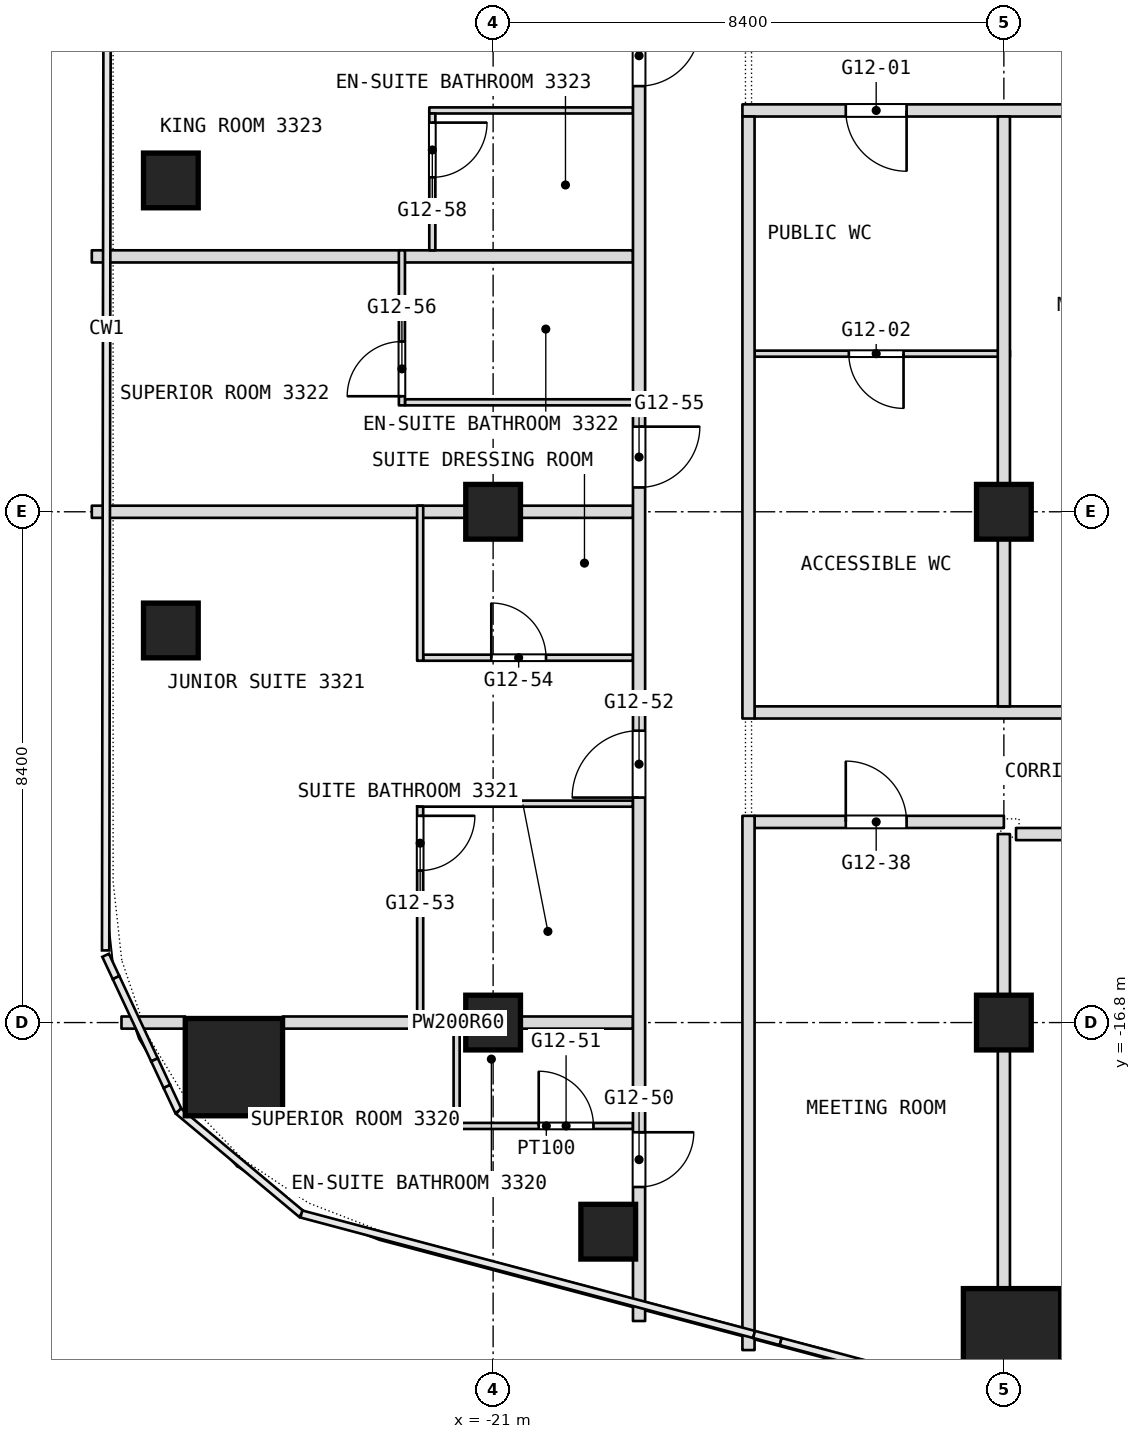
"""IFC4 building model, lengths in metres.
Left out: names, types, materials, properties, quantities, classifications, styles, units other than length and angle.
Written with IfcOpenShell. Run it as: python <this file> out.ifc"""

import sys

from ifc_helpers import new_model, si_unit, direction, frame, frame_2d, origin, origin_2d, place, context, subcontext, project, spatial, rectangle, extrude, element, fill, save


model = new_model("IFC4")
c1 = context("Model", 3, precision=1e-05, world=origin(), true_north=direction((0.0, 1.0)))
c2 = subcontext(c1, "Body", "Model", "MODEL_VIEW")
j1 = project(units=[si_unit("LENGTHUNIT", "METRE"), si_unit("PLANEANGLEUNIT", "RADIAN")], contexts=[c1])
p1 = place(None, origin())
s1 = spatial("IfcSite", under=j1, at=p1, CompositionType="ELEMENT")
p2 = place(p1, origin())
s2 = spatial("IfcBuilding", under=s1, at=p2, CompositionType="ELEMENT")
p3 = place(p2, frame((0.0, 0.0, 144.5)))
s3 = spatial("IfcBuildingStorey", under=s2, at=p3, CompositionType="ELEMENT", Elevation=144.5)
for number, where, z_axis, x_axis in (
    (1, (-25.263, -17.533, 0.0), (0.0, 0.0, 1.0), (1.0, 0.0, 0.0)),
    (2, (-12.466, -21.975, 0.0), (0.0, 0.0, 1.0), (1.0, 0.0, 0.0)),
):
    element("IfcColumn", number, at=place(p3, frame(where, z_axis=z_axis, x_axis=x_axis)), inside=s3, PredefinedType="COLUMN", context=c2, shape_type="SweptSolid", body=[
        extrude(rectangle(XDim=1.6, YDim=1.6, at=origin_2d()), origin(), (0.0, 0.0, 1.0), 3.6),
    ])
for number, where, z_axis, x_axis in (
    (3, (-21.0, -16.8, 0.0), (0.0, 0.0, 1.0), (1.0, 0.0, 0.0)),
    (4, (-21.0, -8.4, 0.0), (0.0, 0.0, 1.0), (1.0, 0.0, 0.0)),
    (5, (-12.6, -16.8, 0.0), (0.0, 0.0, 1.0), (1.0, 0.0, 0.0)),
    (6, (-12.6, -8.4, 0.0), (0.0, 0.0, 1.0), (1.0, 0.0, 0.0)),
    (7, (-26.3, -10.352, 0.0), (0.0, 0.0, 1.0), (1.0, 0.0, 0.0)),
    (8, (-26.3, -2.951, 0.0), (0.0, 0.0, 1.0), (1.0, 0.0, 0.0)),
    (9, (-19.107, -20.239, 0.0), (0.0, 0.0, 1.0), (1.0, 0.0, 0.0)),
):
    element("IfcColumn", number, at=place(p3, frame(where, z_axis=z_axis, x_axis=x_axis)), inside=s3, PredefinedType="COLUMN", context=c2, shape_type="SweptSolid", body=[
        extrude(rectangle(XDim=0.9, YDim=0.9, at=origin_2d()), origin(), (0.0, 0.0, 1.0), 3.6),
    ])
p4 = place(p3, frame((-21.55, -18.5, 0.0), z_axis=(0.0, 0.0, 1.0), x_axis=(1.0, 0.0, 0.0)))
e10 = element("IfcWall", 10, at=p4, inside=s3, PredefinedType="PARTITIONING", context=c2, shape_type="SweptSolid", body=[
    extrude(rectangle(XDim=2.85, YDim=0.1, at=frame_2d((1.425, 0.0))), origin(), (0.0, 0.0, 1.0), 3.34),
])
p5 = place(p4, frame((1.3, 0.0, 0.0)))
e11 = element("IfcOpeningElement", 11, at=p5, cuts=e10, PredefinedType="OPENING", context=c2, shape_type="SweptSolid", body=[
    extrude(rectangle(XDim=0.9, YDim=2.1, at=frame_2d((0.45, 1.05))), frame((0.0, 0.05, 0.0), z_axis=(0.0, -1.0, 0.0), x_axis=(1.0, 0.0, 0.0)), (0.0, 0.0, 1.0), 0.1),
])
p6 = place(p3, frame((-27.112, -16.8, 0.0), z_axis=(0.0, 0.0, 1.0), x_axis=(1.0, 0.0, 0.0)))
e12 = element("IfcWall", 12, at=p6, inside=s3, PredefinedType="PARTITIONING", context=c2, shape_type="SweptSolid", body=[
    extrude(rectangle(XDim=1.049, YDim=0.2, at=frame_2d((0.524, 0.0))), origin(), (0.0, 0.0, 1.0), 3.34),
])
p7 = place(p3, frame((-24.463, -16.8, 0.0), z_axis=(0.0, 0.0, 1.0), x_axis=(1.0, 0.0, 0.0)))
e13 = element("IfcWall", 13, at=p7, inside=s3, PredefinedType="PARTITIONING", context=c2, shape_type="SweptSolid", body=[
    extrude(rectangle(XDim=5.763, YDim=0.2, at=frame_2d((2.881, 0.0))), origin(), (0.0, 0.0, 1.0), 2.89),
])
p8 = place(p3, frame((-12.4, -13.7, 0.0), z_axis=(0.0, 0.0, 1.0), x_axis=(1.0, 0.0, 0.0)))
e14 = element("IfcWall", 14, at=p8, inside=s3, PredefinedType="PARTITIONING", context=c2, shape_type="SweptSolid", body=[
    extrude(rectangle(XDim=9.2, YDim=0.2, at=frame_2d((4.6, 0.0))), origin(), (0.0, 0.0, 1.0), 3.34),
])
p9 = place(p8, frame((3.1, 0.0, 0.0)))
e15 = element("IfcOpeningElement", 15, at=p9, cuts=e14, PredefinedType="OPENING", context=c2, shape_type="SweptSolid", body=[
    extrude(rectangle(XDim=1.8, YDim=2.1, at=frame_2d((0.9, 1.05))), frame((0.0, 0.1, 0.0), z_axis=(0.0, -1.0, 0.0), x_axis=(1.0, 0.0, 0.0)), (0.0, 0.0, 1.0), 0.2),
])
p10 = place(p3, frame((-16.7, -13.5, 0.0), z_axis=(0.0, 0.0, 1.0), x_axis=(1.0, 0.0, 0.0)))
e16 = element("IfcWall", 16, at=p10, inside=s3, PredefinedType="PARTITIONING", context=c2, shape_type="SweptSolid", body=[
    extrude(rectangle(XDim=4.1, YDim=0.2, at=frame_2d((2.05, 0.0))), origin(), (0.0, 0.0, 1.0), 3.34),
])
p11 = place(p10, frame((1.5, 0.0, 0.0)))
e17 = element("IfcOpeningElement", 17, at=p11, cuts=e16, PredefinedType="OPENING", context=c2, shape_type="SweptSolid", body=[
    extrude(rectangle(XDim=1.0, YDim=2.1, at=frame_2d((0.5, 1.05))), frame((0.0, 0.1, 0.0), z_axis=(0.0, -1.0, 0.0), x_axis=(1.0, 0.0, 0.0)), (0.0, 0.0, 1.0), 0.2),
])
p12 = place(p3, frame((-22.25, -13.2, 0.0), z_axis=(0.0, 0.0, 1.0), x_axis=(1.0, 0.0, 0.0)))
e18 = element("IfcWall", 18, at=p12, inside=s3, PredefinedType="PARTITIONING", context=c2, shape_type="SweptSolid", body=[
    extrude(rectangle(XDim=3.55, YDim=0.1, at=frame_2d((1.775, 0.0))), origin(), (0.0, 0.0, 1.0), 3.34),
])
p13 = place(p3, frame((-16.7, -11.7, 0.0), z_axis=(0.0, 0.0, 1.0), x_axis=(1.0, 0.0, 0.0)))
e19 = element("IfcWall", 19, at=p13, inside=s3, PredefinedType="PARTITIONING", context=c2, shape_type="SweptSolid", body=[
    extrude(rectangle(XDim=5.8, YDim=0.2, at=frame_2d((2.9, 0.0))), origin(), (0.0, 0.0, 1.0), 3.34),
])
p14 = place(p3, frame((-22.15, -10.8, 0.0), z_axis=(0.0, 0.0, 1.0), x_axis=(1.0, 0.0, 0.0)))
e20 = element("IfcWall", 20, at=p14, inside=s3, PredefinedType="PARTITIONING", context=c2, shape_type="SweptSolid", body=[
    extrude(rectangle(XDim=3.45, YDim=0.1, at=frame_2d((1.725, 0.0))), origin(), (0.0, 0.0, 1.0), 3.34),
])
p15 = place(p14, frame((1.12, 0.0, 0.0)))
e21 = element("IfcOpeningElement", 21, at=p15, cuts=e20, PredefinedType="OPENING", context=c2, shape_type="SweptSolid", body=[
    extrude(rectangle(XDim=0.9, YDim=2.1, at=frame_2d((0.45, 1.05))), frame((0.0, 0.05, 0.0), z_axis=(0.0, -1.0, 0.0), x_axis=(1.0, 0.0, 0.0)), (0.0, 0.0, 1.0), 0.1),
])
p16 = place(p3, frame((-27.6, -8.4, 0.0), z_axis=(0.0, 0.0, 1.0), x_axis=(1.0, 0.0, 0.0)))
e22 = element("IfcWall", 22, at=p16, inside=s3, PredefinedType="PARTITIONING", context=c2, shape_type="SweptSolid", body=[
    extrude(rectangle(XDim=8.9, YDim=0.2, at=frame_2d((4.45, 0.0))), origin(), (0.0, 0.0, 1.0), 2.89),
])
p17 = place(p3, frame((-22.45, -6.6, 0.0), z_axis=(0.0, 0.0, 1.0), x_axis=(1.0, 0.0, 0.0)))
e23 = element("IfcWall", 23, at=p17, inside=s3, PredefinedType="PARTITIONING", context=c2, shape_type="SweptSolid", body=[
    extrude(rectangle(XDim=3.75, YDim=0.1, at=frame_2d((1.875, 0.0))), origin(), (0.0, 0.0, 1.0), 3.34),
])
p18 = place(p3, frame((-16.7, -5.8, 0.0), z_axis=(0.0, 0.0, 1.0), x_axis=(1.0, 0.0, 0.0)))
e24 = element("IfcWall", 24, at=p18, inside=s3, PredefinedType="PARTITIONING", context=c2, shape_type="SweptSolid", body=[
    extrude(rectangle(XDim=4.2, YDim=0.1, at=frame_2d((2.1, 0.0))), origin(), (0.0, 0.0, 1.0), 3.34),
])
p19 = place(p18, frame((1.55, 0.0, 0.0)))
e25 = element("IfcOpeningElement", 25, at=p19, cuts=e24, PredefinedType="OPENING", context=c2, shape_type="SweptSolid", body=[
    extrude(rectangle(XDim=0.9, YDim=2.1, at=frame_2d((0.45, 1.05))), frame((0.0, 0.05, 0.0), z_axis=(0.0, -1.0, 0.0), x_axis=(1.0, 0.0, 0.0)), (0.0, 0.0, 1.0), 0.1),
])
p20 = place(p3, frame((-27.6, -4.2, 0.0), z_axis=(0.0, 0.0, 1.0), x_axis=(1.0, 0.0, 0.0)))
e26 = element("IfcWall", 26, at=p20, inside=s3, PredefinedType="PARTITIONING", context=c2, shape_type="SweptSolid", body=[
    extrude(rectangle(XDim=8.9, YDim=0.2, at=frame_2d((4.45, 0.0))), origin(), (0.0, 0.0, 1.0), 3.34),
])
p21 = place(p3, frame((-22.05, -1.8, 0.0), z_axis=(0.0, 0.0, 1.0), x_axis=(1.0, 0.0, 0.0)))
e27 = element("IfcWall", 27, at=p21, inside=s3, PredefinedType="PARTITIONING", context=c2, shape_type="SweptSolid", body=[
    extrude(rectangle(XDim=3.35, YDim=0.1, at=frame_2d((1.675, 0.0))), origin(), (0.0, 0.0, 1.0), 3.34),
])
p22 = place(p3, frame((-16.9, -1.8, 0.0), z_axis=(0.0, 0.0, 1.0), x_axis=(1.0, 0.0, 0.0)))
e28 = element("IfcWall", 28, at=p22, inside=s3, PredefinedType="PARTITIONING", context=c2, shape_type="SweptSolid", body=[
    extrude(rectangle(XDim=8.2, YDim=0.2, at=frame_2d((4.1, 0.0))), origin(), (0.0, 0.0, 1.0), 3.34),
])
p23 = place(p22, frame((1.7, 0.0, 0.0)))
e29 = element("IfcOpeningElement", 29, at=p23, cuts=e28, PredefinedType="OPENING", context=c2, shape_type="SweptSolid", body=[
    extrude(rectangle(XDim=1.0, YDim=2.1, at=frame_2d((0.5, 1.05))), frame((0.0, 0.1, 0.0), z_axis=(0.0, -1.0, 0.0), x_axis=(1.0, 0.0, 0.0)), (0.0, 0.0, 1.0), 0.2),
])
p24 = place(p22, frame((5.8, 0.0, 0.0)))
e30 = element("IfcOpeningElement", 30, at=p24, cuts=e28, PredefinedType="OPENING", context=c2, shape_type="SweptSolid", body=[
    extrude(rectangle(XDim=1.0, YDim=2.1, at=frame_2d((0.5, 1.05))), frame((0.0, 0.1, 0.0), z_axis=(0.0, -1.0, 0.0), x_axis=(1.0, 0.0, 0.0)), (0.0, 0.0, 1.0), 0.2),
])
p25 = place(p3, frame((-12.6, -21.175, 0.0), z_axis=(0.0, 0.0, 1.0), x_axis=(0.0, 1.0, 0.0)))
e31 = element("IfcWall", 31, at=p25, inside=s3, PredefinedType="PARTITIONING", context=c2, shape_type="SweptSolid", body=[
    extrude(rectangle(XDim=7.475, YDim=0.2, at=frame_2d((3.738, 0.0))), origin(), (0.0, 0.0, 1.0), 3.34),
])
p26 = place(p3, frame((-12.6, -11.6, 0.0), z_axis=(0.0, 0.0, 1.0), x_axis=(0.0, 1.0, 0.0)))
e32 = element("IfcWall", 32, at=p26, inside=s3, PredefinedType="PARTITIONING", context=c2, shape_type="SweptSolid", body=[
    extrude(rectangle(XDim=9.7, YDim=0.2, at=frame_2d((4.85, 0.0))), origin(), (0.0, 0.0, 1.0), 3.34),
])
p27 = place(p3, frame((-16.8, -22.186, 0.0), z_axis=(0.0, 0.0, 1.0), x_axis=(0.0, 1.0, 0.0)))
e33 = element("IfcWall", 33, at=p27, inside=s3, PredefinedType="PARTITIONING", context=c2, shape_type="SweptSolid", body=[
    extrude(rectangle(XDim=8.786, YDim=0.2, at=frame_2d((4.393, 0.0))), origin(), (0.0, 0.0, 1.0), 3.34),
])
p28 = place(p3, frame((-16.8, -11.8, 0.0), z_axis=(0.0, 0.0, 1.0), x_axis=(0.0, 1.0, 0.0)))
e34 = element("IfcWall", 34, at=p28, inside=s3, PredefinedType="PARTITIONING", context=c2, shape_type="SweptSolid", body=[
    extrude(rectangle(XDim=9.9, YDim=0.2, at=frame_2d((4.95, 0.0))), origin(), (0.0, 0.0, 1.0), 3.34),
])
p29 = place(p3, frame((-18.6, -21.708, 0.0), z_axis=(0.0, 0.0, 1.0), x_axis=(0.0, 1.0, 0.0)))
e35 = element("IfcWall", 35, at=p29, inside=s3, PredefinedType="PARTITIONING", context=c2, shape_type="SweptSolid", body=[
    extrude(rectangle(XDim=28.608, YDim=0.2, at=frame_2d((14.304, 0.0))), origin(), (0.0, 0.0, 1.0), 3.34),
])
p30 = place(p29, frame((2.204, 0.0, 0.0)))
e36 = element("IfcOpeningElement", 36, at=p30, cuts=e35, PredefinedType="OPENING", context=c2, shape_type="SweptSolid", body=[
    extrude(rectangle(XDim=0.9, YDim=2.1, at=frame_2d((0.45, 1.05))), frame((0.0, 0.1, 0.0), z_axis=(0.0, -1.0, 0.0), x_axis=(1.0, 0.0, 0.0)), (0.0, 0.0, 1.0), 0.2),
])
p31 = place(p29, frame((8.608, 0.0, 0.0)))
e37 = element("IfcOpeningElement", 37, at=p31, cuts=e35, PredefinedType="OPENING", context=c2, shape_type="SweptSolid", body=[
    extrude(rectangle(XDim=1.1, YDim=2.1, at=frame_2d((0.55, 1.05))), frame((0.0, 0.1, 0.0), z_axis=(0.0, -1.0, 0.0), x_axis=(1.0, 0.0, 0.0)), (0.0, 0.0, 1.0), 0.2),
])
p32 = place(p29, frame((13.708, 0.0, 0.0)))
e38 = element("IfcOpeningElement", 38, at=p32, cuts=e35, PredefinedType="OPENING", context=c2, shape_type="SweptSolid", body=[
    extrude(rectangle(XDim=1.0, YDim=2.1, at=frame_2d((0.5, 1.05))), frame((0.0, 0.1, 0.0), z_axis=(0.0, -1.0, 0.0), x_axis=(1.0, 0.0, 0.0)), (0.0, 0.0, 1.0), 0.2),
])
p33 = place(p29, frame((20.308, 0.0, 0.0)))
e39 = element("IfcOpeningElement", 39, at=p33, cuts=e35, PredefinedType="OPENING", context=c2, shape_type="SweptSolid", body=[
    extrude(rectangle(XDim=1.0, YDim=2.1, at=frame_2d((0.5, 1.05))), frame((0.0, 0.1, 0.0), z_axis=(0.0, -1.0, 0.0), x_axis=(1.0, 0.0, 0.0)), (0.0, 0.0, 1.0), 0.2),
])
p34 = place(p29, frame((24.508, 0.0, 0.0)))
e40 = element("IfcOpeningElement", 40, at=p34, cuts=e35, PredefinedType="OPENING", context=c2, shape_type="SweptSolid", body=[
    extrude(rectangle(XDim=1.0, YDim=2.1, at=frame_2d((0.5, 1.05))), frame((0.0, 0.1, 0.0), z_axis=(0.0, -1.0, 0.0), x_axis=(1.0, 0.0, 0.0)), (0.0, 0.0, 1.0), 0.2),
])
p35 = place(p3, frame((-21.6, -18.55, 0.0), z_axis=(0.0, 0.0, 1.0), x_axis=(0.0, 1.0, 0.0)))
e41 = element("IfcWall", 41, at=p35, inside=s3, PredefinedType="PARTITIONING", context=c2, shape_type="SweptSolid", body=[
    extrude(rectangle(XDim=1.85, YDim=0.1, at=frame_2d((0.925, 0.0))), origin(), (0.0, 0.0, 1.0), 3.34),
])
p36 = place(p3, frame((-22.0, -4.1, 0.0), z_axis=(0.0, 0.0, 1.0), x_axis=(0.0, 1.0, 0.0)))
e42 = element("IfcWall", 42, at=p36, inside=s3, PredefinedType="PARTITIONING", context=c2, shape_type="SweptSolid", body=[
    extrude(rectangle(XDim=2.25, YDim=0.1, at=frame_2d((1.125, 0.0))), origin(), (0.0, 0.0, 1.0), 3.34),
])
p37 = place(p36, frame((1.2, 0.0, 0.0)))
e43 = element("IfcOpeningElement", 43, at=p37, cuts=e42, PredefinedType="OPENING", context=c2, shape_type="SweptSolid", body=[
    extrude(rectangle(XDim=0.9, YDim=2.1, at=frame_2d((0.45, 1.05))), frame((0.0, 0.05, 0.0), z_axis=(0.0, -1.0, 0.0), x_axis=(1.0, 0.0, 0.0)), (0.0, 0.0, 1.0), 0.1),
])
p38 = place(p3, frame((-22.2, -16.7, 0.0), z_axis=(0.0, 0.0, 1.0), x_axis=(0.0, 1.0, 0.0)))
e44 = element("IfcWall", 44, at=p38, inside=s3, PredefinedType="PARTITIONING", context=c2, shape_type="SweptSolid", body=[
    extrude(rectangle(XDim=3.45, YDim=0.1, at=frame_2d((1.725, 0.0))), origin(), (0.0, 0.0, 1.0), 3.34),
])
p39 = place(p38, frame((2.4, 0.0, 0.0)))
e45 = element("IfcOpeningElement", 45, at=p39, cuts=e44, PredefinedType="OPENING", context=c2, shape_type="SweptSolid", body=[
    extrude(rectangle(XDim=0.9, YDim=2.1, at=frame_2d((0.45, 1.05))), frame((0.0, 0.05, 0.0), z_axis=(0.0, -1.0, 0.0), x_axis=(1.0, 0.0, 0.0)), (0.0, 0.0, 1.0), 0.1),
])
p40 = place(p3, frame((-22.2, -10.85, 0.0), z_axis=(0.0, 0.0, 1.0), x_axis=(0.0, 1.0, 0.0)))
e46 = element("IfcWall", 46, at=p40, inside=s3, PredefinedType="PARTITIONING", context=c2, shape_type="SweptSolid", body=[
    extrude(rectangle(XDim=2.55, YDim=0.1, at=frame_2d((1.275, 0.0))), origin(), (0.0, 0.0, 1.0), 3.34),
])
p41 = place(p3, frame((-22.5, -6.65, 0.0), z_axis=(0.0, 0.0, 1.0), x_axis=(0.0, 1.0, 0.0)))
e47 = element("IfcWall", 47, at=p41, inside=s3, PredefinedType="PARTITIONING", context=c2, shape_type="SweptSolid", body=[
    extrude(rectangle(XDim=2.55, YDim=0.1, at=frame_2d((1.275, 0.0))), origin(), (0.0, 0.0, 1.0), 3.34),
])
p42 = place(p41, frame((0.15, 0.0, 0.0)))
e48 = element("IfcOpeningElement", 48, at=p42, cuts=e47, PredefinedType="OPENING", context=c2, shape_type="SweptSolid", body=[
    extrude(rectangle(XDim=0.9, YDim=2.1, at=frame_2d((0.45, 1.05))), frame((0.0, 0.05, 0.0), z_axis=(0.0, -1.0, 0.0), x_axis=(1.0, 0.0, 0.0)), (0.0, 0.0, 1.0), 0.1),
])
p43 = place(p5, origin())
e49 = element("IfcDoor", 49, at=p43, inside=s3, OperationType="SINGLE_SWING_RIGHT", PredefinedType="DOOR", context=c2, shape_type="SweptSolid", body=[
    extrude(rectangle(XDim=0.9, YDim=2.1, at=frame_2d((0.45, 1.05))), frame((0.0, 0.025, 0.0), z_axis=(0.0, -1.0, 0.0), x_axis=(1.0, 0.0, 0.0)), (0.0, 0.0, 1.0), 0.05),
])
fill(e11, e49)
p44 = place(p11, origin())
e50 = element("IfcDoor", 50, at=p44, inside=s3, OperationType="SINGLE_SWING_LEFT", PredefinedType="DOOR", context=c2, shape_type="SweptSolid", body=[
    extrude(rectangle(XDim=1.0, YDim=2.1, at=frame_2d((0.5, 1.05))), frame((0.0, 0.025, 0.0), z_axis=(0.0, -1.0, 0.0), x_axis=(1.0, 0.0, 0.0)), (0.0, 0.0, 1.0), 0.05),
])
fill(e17, e50)
p45 = place(p15, origin())
e51 = element("IfcDoor", 51, at=p45, inside=s3, OperationType="SINGLE_SWING_LEFT", PredefinedType="DOOR", context=c2, shape_type="SweptSolid", body=[
    extrude(rectangle(XDim=0.9, YDim=2.1, at=frame_2d((0.45, 1.05))), frame((0.0, 0.025, 0.0), z_axis=(0.0, -1.0, 0.0), x_axis=(1.0, 0.0, 0.0)), (0.0, 0.0, 1.0), 0.05),
])
fill(e21, e51)
p46 = place(p19, origin())
e52 = element("IfcDoor", 52, at=p46, inside=s3, OperationType="SINGLE_SWING_RIGHT", PredefinedType="DOOR", context=c2, shape_type="SweptSolid", body=[
    extrude(rectangle(XDim=0.9, YDim=2.1, at=frame_2d((0.45, 1.05))), frame((0.0, 0.025, 0.0), z_axis=(0.0, -1.0, 0.0), x_axis=(1.0, 0.0, 0.0)), (0.0, 0.0, 1.0), 0.05),
])
fill(e25, e52)
p47 = place(p23, origin())
e53 = element("IfcDoor", 53, at=p47, inside=s3, OperationType="SINGLE_SWING_LEFT", PredefinedType="DOOR", context=c2, shape_type="SweptSolid", body=[
    extrude(rectangle(XDim=1.0, YDim=2.1, at=frame_2d((0.5, 1.05))), frame((0.0, 0.025, 0.0), z_axis=(0.0, -1.0, 0.0), x_axis=(1.0, 0.0, 0.0)), (0.0, 0.0, 1.0), 0.05),
])
fill(e29, e53)
p48 = place(p30, origin())
e54 = element("IfcDoor", 54, at=p48, inside=s3, OperationType="SINGLE_SWING_RIGHT", PredefinedType="DOOR", context=c2, shape_type="SweptSolid", body=[
    extrude(rectangle(XDim=0.9, YDim=2.1, at=frame_2d((0.45, 1.05))), frame((0.0, 0.025, 0.0), z_axis=(0.0, -1.0, 0.0), x_axis=(1.0, 0.0, 0.0)), (0.0, 0.0, 1.0), 0.05),
])
fill(e36, e54)
p49 = place(p31, origin())
e55 = element("IfcDoor", 55, at=p49, inside=s3, OperationType="SINGLE_SWING_LEFT", PredefinedType="DOOR", context=c2, shape_type="SweptSolid", body=[
    extrude(rectangle(XDim=1.1, YDim=2.1, at=frame_2d((0.55, 1.05))), frame((0.0, 0.025, 0.0), z_axis=(0.0, -1.0, 0.0), x_axis=(1.0, 0.0, 0.0)), (0.0, 0.0, 1.0), 0.05),
])
fill(e37, e55)
p50 = place(p32, origin())
e56 = element("IfcDoor", 56, at=p50, inside=s3, OperationType="SINGLE_SWING_RIGHT", PredefinedType="DOOR", context=c2, shape_type="SweptSolid", body=[
    extrude(rectangle(XDim=1.0, YDim=2.1, at=frame_2d((0.5, 1.05))), frame((0.0, 0.025, 0.0), z_axis=(0.0, -1.0, 0.0), x_axis=(1.0, 0.0, 0.0)), (0.0, 0.0, 1.0), 0.05),
])
fill(e38, e56)
p51 = place(p33, origin())
e57 = element("IfcDoor", 57, at=p51, inside=s3, OperationType="SINGLE_SWING_RIGHT", PredefinedType="DOOR", context=c2, shape_type="SweptSolid", body=[
    extrude(rectangle(XDim=1.0, YDim=2.1, at=frame_2d((0.5, 1.05))), frame((0.0, 0.025, 0.0), z_axis=(0.0, -1.0, 0.0), x_axis=(1.0, 0.0, 0.0)), (0.0, 0.0, 1.0), 0.05),
])
fill(e39, e57)
p52 = place(p37, origin())
e58 = element("IfcDoor", 58, at=p52, inside=s3, OperationType="SINGLE_SWING_LEFT", PredefinedType="DOOR", context=c2, shape_type="SweptSolid", body=[
    extrude(rectangle(XDim=0.9, YDim=2.1, at=frame_2d((0.45, 1.05))), frame((0.0, 0.025, 0.0), z_axis=(0.0, -1.0, 0.0), x_axis=(1.0, 0.0, 0.0)), (0.0, 0.0, 1.0), 0.05),
])
fill(e43, e58)
p53 = place(p39, origin())
e59 = element("IfcDoor", 59, at=p53, inside=s3, OperationType="SINGLE_SWING_LEFT", PredefinedType="DOOR", context=c2, shape_type="SweptSolid", body=[
    extrude(rectangle(XDim=0.9, YDim=2.1, at=frame_2d((0.45, 1.05))), frame((0.0, 0.025, 0.0), z_axis=(0.0, -1.0, 0.0), x_axis=(1.0, 0.0, 0.0)), (0.0, 0.0, 1.0), 0.05),
])
fill(e45, e59)
p54 = place(p42, origin())
e60 = element("IfcDoor", 60, at=p54, inside=s3, OperationType="SINGLE_SWING_RIGHT", PredefinedType="DOOR", context=c2, shape_type="SweptSolid", body=[
    extrude(rectangle(XDim=0.9, YDim=2.1, at=frame_2d((0.45, 1.05))), frame((0.0, 0.025, 0.0), z_axis=(0.0, -1.0, 0.0), x_axis=(1.0, 0.0, 0.0)), (0.0, 0.0, 1.0), 0.05),
])
fill(e48, e60)
save(model, sys.argv[1])
